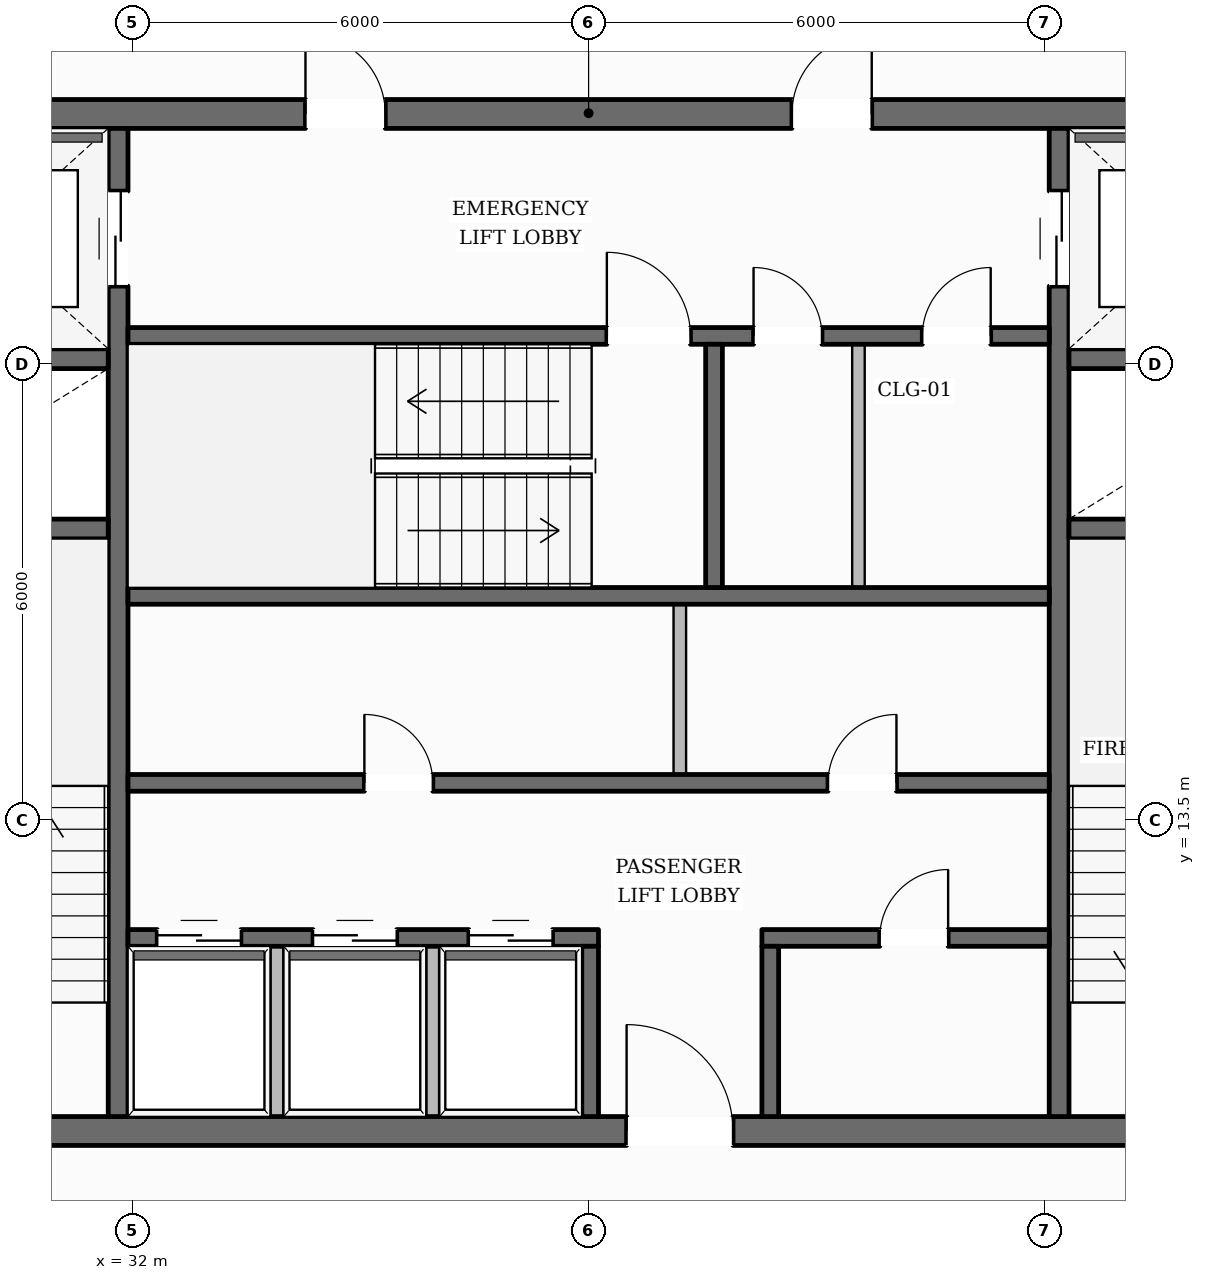
"""IFC4 building model, lengths in metres.
Left out: names, types, materials, properties, quantities, classifications, styles, units other than length and angle.
Written with IfcOpenShell. Run it as: python <this file> out.ifc"""

import sys

from ifc_helpers import new_model, si_unit, direction, frame, frame_2d, origin, place, context, subcontext, project, spatial, rectangle, extrude, element, fill, save


model = new_model("IFC4")
c1 = context("Model", 3, precision=1e-05, world=origin(), true_north=direction((0.0, 1.0)))
c2 = subcontext(c1, "Body", "Model", "MODEL_VIEW")
j1 = project(units=[si_unit("LENGTHUNIT", "METRE"), si_unit("PLANEANGLEUNIT", "RADIAN")], contexts=[c1])
p1 = place(None, origin())
s1 = spatial("IfcSite", under=j1, at=p1, CompositionType="ELEMENT")
p2 = place(p1, origin())
s2 = spatial("IfcBuilding", under=s1, at=p2, CompositionType="ELEMENT")
p3 = place(p2, frame((0.0, 0.0, 247.2)))
s3 = spatial("IfcBuildingStorey", under=s2, at=p3, CompositionType="ELEMENT", Elevation=247.2)
p4 = place(p3, frame((28.1, 9.41, 0.0), z_axis=(0.0, 0.0, 1.0), x_axis=(1.0, 0.0, 0.0)))
e1 = element("IfcWall", 1, at=p4, inside=s3, PredefinedType="SOLIDWALL", context=c2, shape_type="SweptSolid", body=[
    extrude(rectangle(XDim=19.8, YDim=0.38, at=frame_2d((9.9, 0.0))), origin(), (0.0, 0.0, 1.0), 3.61),
])
p5 = place(p4, frame((10.4, 0.0, 0.0)))
e2 = element("IfcOpeningElement", 2, at=p5, cuts=e1, PredefinedType="OPENING", context=c2, shape_type="SweptSolid", body=[
    extrude(rectangle(XDim=1.4, YDim=2.2, at=frame_2d((0.7, 1.1))), frame((0.0, 0.2, 0.0), z_axis=(0.0, -1.0, 0.0), x_axis=(1.0, 0.0, 0.0)), (0.0, 0.0, 1.0), 0.4),
])
p6 = place(p3, frame((28.1, 22.79, 0.0), z_axis=(0.0, 0.0, 1.0), x_axis=(1.0, 0.0, 0.0)))
e3 = element("IfcWall", 3, at=p6, inside=s3, PredefinedType="SOLIDWALL", context=c2, shape_type="SweptSolid", body=[
    extrude(rectangle(XDim=19.8, YDim=0.38, at=frame_2d((9.9, 0.0))), origin(), (0.0, 0.0, 1.0), 3.61),
])
p7 = place(p6, frame((6.175, 0.0, 0.0)))
e4 = element("IfcOpeningElement", 4, at=p7, cuts=e3, PredefinedType="OPENING", context=c2, shape_type="SweptSolid", body=[
    extrude(rectangle(XDim=1.05, YDim=2.15, at=frame_2d((0.525, 1.075))), frame((0.0, 0.2, 0.0), z_axis=(0.0, -1.0, 0.0), x_axis=(1.0, 0.0, 0.0)), (0.0, 0.0, 1.0), 0.4),
])
p8 = place(p6, frame((12.575, 0.0, 0.0)))
e5 = element("IfcOpeningElement", 5, at=p8, cuts=e3, PredefinedType="OPENING", context=c2, shape_type="SweptSolid", body=[
    extrude(rectangle(XDim=1.05, YDim=2.15, at=frame_2d((0.525, 1.075))), frame((0.0, 0.2, 0.0), z_axis=(0.0, -1.0, 0.0), x_axis=(1.0, 0.0, 0.0)), (0.0, 0.0, 1.0), 0.4),
])
p9 = place(p3, frame((31.81, 9.6, 0.0), z_axis=(0.0, 0.0, 1.0), x_axis=(0.0, 1.0, 0.0)))
e6 = element("IfcWall", 6, at=p9, inside=s3, PredefinedType="SHEAR", context=c2, shape_type="SweptSolid", body=[
    extrude(rectangle(XDim=13.0, YDim=0.26, at=frame_2d((6.5, 0.0))), origin(), (0.0, 0.0, 1.0), 3.61),
])
p10 = place(p9, frame((10.925, 0.0, 0.0)))
e7 = element("IfcOpeningElement", 7, at=p10, cuts=e6, PredefinedType="OPENING", context=c2, shape_type="SweptSolid", body=[
    extrude(rectangle(XDim=1.25, YDim=2.25, at=frame_2d((0.625, 1.125))), frame((0.0, 0.14, 0.0), z_axis=(0.0, -1.0, 0.0), x_axis=(1.0, 0.0, 0.0)), (0.0, 0.0, 1.0), 0.28),
])
p11 = place(p3, frame((44.19, 9.6, 0.0), z_axis=(0.0, 0.0, 1.0), x_axis=(0.0, 1.0, 0.0)))
e8 = element("IfcWall", 8, at=p11, inside=s3, PredefinedType="SHEAR", context=c2, shape_type="SweptSolid", body=[
    extrude(rectangle(XDim=13.0, YDim=0.26, at=frame_2d((6.5, 0.0))), origin(), (0.0, 0.0, 1.0), 3.61),
])
p12 = place(p11, frame((10.925, 0.0, 0.0)))
e9 = element("IfcOpeningElement", 9, at=p12, cuts=e8, PredefinedType="OPENING", context=c2, shape_type="SweptSolid", body=[
    extrude(rectangle(XDim=1.25, YDim=2.25, at=frame_2d((0.625, 1.125))), frame((0.0, 0.14, 0.0), z_axis=(0.0, -1.0, 0.0), x_axis=(1.0, 0.0, 0.0)), (0.0, 0.0, 1.0), 0.28),
])
for number, where, z_axis, x_axis in (
    (10, (28.48, 17.33, 0.0), (0.0, 0.0, 1.0), (1.0, 0.0, 0.0)),
    (11, (28.48, 19.57, 0.0), (0.0, 0.0, 1.0), (1.0, 0.0, 0.0)),
    (12, (44.32, 17.33, 0.0), (0.0, 0.0, 1.0), (1.0, 0.0, 0.0)),
    (13, (44.32, 19.57, 0.0), (0.0, 0.0, 1.0), (1.0, 0.0, 0.0)),
):
    element("IfcWall", number, at=place(p3, frame(where, z_axis=z_axis, x_axis=x_axis)), inside=s3, PredefinedType="SHEAR", context=c2, shape_type="SweptSolid", body=[
        extrude(rectangle(XDim=3.2, YDim=0.26, at=frame_2d((1.6, 0.0))), origin(), (0.0, 0.0, 1.0), 3.61),
    ])
p13 = place(p3, frame((31.94, 19.87, 0.0), z_axis=(0.0, 0.0, 1.0), x_axis=(1.0, 0.0, 0.0)))
e14 = element("IfcWall", 14, at=p13, inside=s3, PredefinedType="SOLIDWALL", context=c2, shape_type="SweptSolid", body=[
    extrude(rectangle(XDim=12.12, YDim=0.22, at=frame_2d((6.06, 0.0))), origin(), (0.0, 0.0, 1.0), 3.61),
])
p14 = place(p13, frame((6.3, 0.0, 0.0)))
e15 = element("IfcOpeningElement", 15, at=p14, cuts=e14, PredefinedType="OPENING", context=c2, shape_type="SweptSolid", body=[
    extrude(rectangle(XDim=1.1, YDim=2.15, at=frame_2d((0.55, 1.075))), frame((0.0, 0.12, 0.0), z_axis=(0.0, -1.0, 0.0), x_axis=(1.0, 0.0, 0.0)), (0.0, 0.0, 1.0), 0.24),
])
p15 = place(p13, frame((8.23, 0.0, 0.0)))
e16 = element("IfcOpeningElement", 16, at=p15, cuts=e14, PredefinedType="OPENING", context=c2, shape_type="SweptSolid", body=[
    extrude(rectangle(XDim=0.9, YDim=2.1, at=frame_2d((0.45, 1.05))), frame((0.0, 0.12, 0.0), z_axis=(0.0, -1.0, 0.0), x_axis=(1.0, 0.0, 0.0)), (0.0, 0.0, 1.0), 0.24),
])
p16 = place(p13, frame((10.45, 0.0, 0.0)))
e17 = element("IfcOpeningElement", 17, at=p16, cuts=e14, PredefinedType="OPENING", context=c2, shape_type="SweptSolid", body=[
    extrude(rectangle(XDim=0.9, YDim=2.1, at=frame_2d((0.45, 1.05))), frame((0.0, 0.12, 0.0), z_axis=(0.0, -1.0, 0.0), x_axis=(1.0, 0.0, 0.0)), (0.0, 0.0, 1.0), 0.24),
])
p17 = place(p3, frame((31.94, 16.45, 0.0), z_axis=(0.0, 0.0, 1.0), x_axis=(1.0, 0.0, 0.0)))
e18 = element("IfcWall", 18, at=p17, inside=s3, PredefinedType="SOLIDWALL", context=c2, shape_type="SweptSolid", body=[
    extrude(rectangle(XDim=12.12, YDim=0.22, at=frame_2d((6.06, 0.0))), origin(), (0.0, 0.0, 1.0), 3.61),
])
p18 = place(p3, frame((39.65, 16.56, 0.0), z_axis=(0.0, 0.0, 1.0), x_axis=(0.0, 1.0, 0.0)))
e19 = element("IfcWall", 19, at=p18, inside=s3, PredefinedType="SOLIDWALL", context=c2, shape_type="SweptSolid", body=[
    extrude(rectangle(XDim=3.2, YDim=0.22, at=frame_2d((1.6, 0.0))), origin(), (0.0, 0.0, 1.0), 3.61),
])
p19 = place(p3, frame((31.94, 13.99, 0.0), z_axis=(0.0, 0.0, 1.0), x_axis=(1.0, 0.0, 0.0)))
e20 = element("IfcWall", 20, at=p19, inside=s3, PredefinedType="SOLIDWALL", context=c2, shape_type="SweptSolid", body=[
    extrude(rectangle(XDim=12.12, YDim=0.22, at=frame_2d((6.06, 0.0))), origin(), (0.0, 0.0, 1.0), 3.61),
])
p20 = place(p19, frame((3.11, 0.0, 0.0)))
e21 = element("IfcOpeningElement", 21, at=p20, cuts=e20, PredefinedType="OPENING", context=c2, shape_type="SweptSolid", body=[
    extrude(rectangle(XDim=0.9, YDim=2.1, at=frame_2d((0.45, 1.05))), frame((0.0, 0.12, 0.0), z_axis=(0.0, -1.0, 0.0), x_axis=(1.0, 0.0, 0.0)), (0.0, 0.0, 1.0), 0.24),
])
p21 = place(p19, frame((9.21, 0.0, 0.0)))
e22 = element("IfcOpeningElement", 22, at=p21, cuts=e20, PredefinedType="OPENING", context=c2, shape_type="SweptSolid", body=[
    extrude(rectangle(XDim=0.9, YDim=2.1, at=frame_2d((0.45, 1.05))), frame((0.0, 0.12, 0.0), z_axis=(0.0, -1.0, 0.0), x_axis=(1.0, 0.0, 0.0)), (0.0, 0.0, 1.0), 0.24),
])
p22 = place(p3, frame((31.94, 11.95, 0.0), z_axis=(0.0, 0.0, 1.0), x_axis=(1.0, 0.0, 0.0)))
e23 = element("IfcWall", 23, at=p22, inside=s3, PredefinedType="SOLIDWALL", context=c2, shape_type="SweptSolid", body=[
    extrude(rectangle(XDim=6.19, YDim=0.22, at=frame_2d((3.095, 0.0))), origin(), (0.0, 0.0, 1.0), 3.61),
])
p23 = place(p22, frame((0.385, 0.0, 0.0)))
e24 = element("IfcOpeningElement", 24, at=p23, cuts=e23, PredefinedType="OPENING", context=c2, shape_type="SweptSolid", body=[
    extrude(rectangle(XDim=1.1, YDim=2.2, at=frame_2d((0.55, 1.1))), frame((0.0, 0.12, 0.0), z_axis=(0.0, -1.0, 0.0), x_axis=(1.0, 0.0, 0.0)), (0.0, 0.0, 1.0), 0.24),
])
p24 = place(p22, frame((2.435, 0.0, 0.0)))
e25 = element("IfcOpeningElement", 25, at=p24, cuts=e23, PredefinedType="OPENING", context=c2, shape_type="SweptSolid", body=[
    extrude(rectangle(XDim=1.1, YDim=2.2, at=frame_2d((0.55, 1.1))), frame((0.0, 0.12, 0.0), z_axis=(0.0, -1.0, 0.0), x_axis=(1.0, 0.0, 0.0)), (0.0, 0.0, 1.0), 0.24),
])
p25 = place(p22, frame((4.485, 0.0, 0.0)))
e26 = element("IfcOpeningElement", 26, at=p25, cuts=e23, PredefinedType="OPENING", context=c2, shape_type="SweptSolid", body=[
    extrude(rectangle(XDim=1.1, YDim=2.2, at=frame_2d((0.55, 1.1))), frame((0.0, 0.12, 0.0), z_axis=(0.0, -1.0, 0.0), x_axis=(1.0, 0.0, 0.0)), (0.0, 0.0, 1.0), 0.24),
])
p26 = place(p3, frame((40.28, 11.95, 0.0), z_axis=(0.0, 0.0, 1.0), x_axis=(1.0, 0.0, 0.0)))
e27 = element("IfcWall", 27, at=p26, inside=s3, PredefinedType="SOLIDWALL", context=c2, shape_type="SweptSolid", body=[
    extrude(rectangle(XDim=3.78, YDim=0.22, at=frame_2d((1.89, 0.0))), origin(), (0.0, 0.0, 1.0), 3.61),
])
p27 = place(p26, frame((1.55, 0.0, 0.0)))
e28 = element("IfcOpeningElement", 28, at=p27, cuts=e27, PredefinedType="OPENING", context=c2, shape_type="SweptSolid", body=[
    extrude(rectangle(XDim=0.9, YDim=2.1, at=frame_2d((0.45, 1.05))), frame((0.0, 0.12, 0.0), z_axis=(0.0, -1.0, 0.0), x_axis=(1.0, 0.0, 0.0)), (0.0, 0.0, 1.0), 0.24),
])
for number, where, z_axis, x_axis in (
    (29, (38.02, 9.6, 0.0), (0.0, 0.0, 1.0), (0.0, 1.0, 0.0)),
    (30, (40.39, 9.6, 0.0), (0.0, 0.0, 1.0), (0.0, 1.0, 0.0)),
):
    element("IfcWall", number, at=place(p3, frame(where, z_axis=z_axis, x_axis=x_axis)), inside=s3, PredefinedType="SOLIDWALL", context=c2, shape_type="SweptSolid", body=[
        extrude(rectangle(XDim=2.24, YDim=0.22, at=frame_2d((1.12, 0.0))), origin(), (0.0, 0.0, 1.0), 3.61),
    ])
p28 = place(p3, frame((16.282, 11.281, 0.0), z_axis=(0.0, 0.0, 1.0), x_axis=(0.492304911919, 0.870422813178, 0.0)))
e31 = element("IfcWall", 31, at=p28, inside=s3, PredefinedType="STANDARD", context=c2, shape_type="SweptSolid", body=[
    extrude(rectangle(XDim=37.613, YDim=0.35, at=frame_2d((18.807, 0.0))), origin(), (0.0, 0.0, 1.0), 3.196),
])
p29 = place(p28, frame((9.003, 0.0, 0.0)))
e32 = element("IfcOpeningElement", 32, at=p29, cuts=e31, PredefinedType="OPENING", context=c2, shape_type="SweptSolid", body=[
    extrude(rectangle(XDim=1.0, YDim=2.2, at=frame_2d((0.5, 1.1))), frame((0.0, 0.185, 0.0), z_axis=(0.0, -1.0, 0.0), x_axis=(1.0, 0.0, 0.0)), (0.0, 0.0, 1.0), 0.37),
])
p30 = place(p28, frame((33.4, 0.0, 0.65)))
e33 = element("IfcOpeningElement", 33, at=p30, cuts=e31, PredefinedType="OPENING", context=c2, shape_type="SweptSolid", body=[
    extrude(rectangle(XDim=1.35, YDim=1.75, at=frame_2d((0.675, 0.875))), frame((0.0, 0.185, 0.0), z_axis=(0.0, -1.0, 0.0), x_axis=(1.0, 0.0, 0.0)), (0.0, 0.0, 1.0), 0.37),
])
p31 = place(p28, frame((27.291, 0.0, 0.65)))
e34 = element("IfcOpeningElement", 34, at=p31, cuts=e31, PredefinedType="OPENING", context=c2, shape_type="SweptSolid", body=[
    extrude(rectangle(XDim=1.35, YDim=1.75, at=frame_2d((0.675, 0.875))), frame((0.0, 0.185, 0.0), z_axis=(0.0, -1.0, 0.0), x_axis=(1.0, 0.0, 0.0)), (0.0, 0.0, 1.0), 0.37),
])
p32 = place(p28, frame((21.182, 0.0, 0.65)))
e35 = element("IfcOpeningElement", 35, at=p32, cuts=e31, PredefinedType="OPENING", context=c2, shape_type="SweptSolid", body=[
    extrude(rectangle(XDim=1.35, YDim=1.75, at=frame_2d((0.675, 0.875))), frame((0.0, 0.185, 0.0), z_axis=(0.0, -1.0, 0.0), x_axis=(1.0, 0.0, 0.0)), (0.0, 0.0, 1.0), 0.37),
])
p33 = place(p28, frame((2.854, 0.0, 0.65)))
e36 = element("IfcOpeningElement", 36, at=p33, cuts=e31, PredefinedType="OPENING", context=c2, shape_type="SweptSolid", body=[
    extrude(rectangle(XDim=1.35, YDim=1.75, at=frame_2d((0.675, 0.875))), frame((0.0, 0.185, 0.0), z_axis=(0.0, -1.0, 0.0), x_axis=(1.0, 0.0, 0.0)), (0.0, 0.0, 1.0), 0.37),
])
p34 = place(p3, frame((41.327, 43.945, 0.0), z_axis=(0.0, 0.0, 1.0), x_axis=(0.501242173683, -0.865307045691, 0.0)))
e37 = element("IfcWall", 37, at=p34, inside=s3, PredefinedType="STANDARD", context=c2, shape_type="SweptSolid", body=[
    extrude(rectangle(XDim=38.277, YDim=0.35, at=frame_2d((19.138, 0.0))), origin(), (0.0, 0.0, 1.0), 3.196),
])
p35 = place(p34, frame((9.169, 0.0, 0.0)))
e38 = element("IfcOpeningElement", 38, at=p35, cuts=e37, PredefinedType="OPENING", context=c2, shape_type="SweptSolid", body=[
    extrude(rectangle(XDim=1.0, YDim=2.2, at=frame_2d((0.5, 1.1))), frame((0.0, 0.185, 0.0), z_axis=(0.0, -1.0, 0.0), x_axis=(1.0, 0.0, 0.0)), (0.0, 0.0, 1.0), 0.37),
])
p36 = place(p34, frame((34.016, 0.0, 0.65)))
e39 = element("IfcOpeningElement", 39, at=p36, cuts=e37, PredefinedType="OPENING", context=c2, shape_type="SweptSolid", body=[
    extrude(rectangle(XDim=1.35, YDim=1.75, at=frame_2d((0.675, 0.875))), frame((0.0, 0.185, 0.0), z_axis=(0.0, -1.0, 0.0), x_axis=(1.0, 0.0, 0.0)), (0.0, 0.0, 1.0), 0.37),
])
p37 = place(p34, frame((27.795, 0.0, 0.65)))
e40 = element("IfcOpeningElement", 40, at=p37, cuts=e37, PredefinedType="OPENING", context=c2, shape_type="SweptSolid", body=[
    extrude(rectangle(XDim=1.35, YDim=1.75, at=frame_2d((0.675, 0.875))), frame((0.0, 0.185, 0.0), z_axis=(0.0, -1.0, 0.0), x_axis=(1.0, 0.0, 0.0)), (0.0, 0.0, 1.0), 0.37),
])
p38 = place(p34, frame((21.573, 0.0, 0.65)))
e41 = element("IfcOpeningElement", 41, at=p38, cuts=e37, PredefinedType="OPENING", context=c2, shape_type="SweptSolid", body=[
    extrude(rectangle(XDim=1.35, YDim=1.75, at=frame_2d((0.675, 0.875))), frame((0.0, 0.185, 0.0), z_axis=(0.0, -1.0, 0.0), x_axis=(1.0, 0.0, 0.0)), (0.0, 0.0, 1.0), 0.37),
])
p39 = place(p34, frame((2.909, 0.0, 0.65)))
e42 = element("IfcOpeningElement", 42, at=p39, cuts=e37, PredefinedType="OPENING", context=c2, shape_type="SweptSolid", body=[
    extrude(rectangle(XDim=1.35, YDim=1.75, at=frame_2d((0.675, 0.875))), frame((0.0, 0.185, 0.0), z_axis=(0.0, -1.0, 0.0), x_axis=(1.0, 0.0, 0.0)), (0.0, 0.0, 1.0), 0.37),
])
for number, where, z_axis, x_axis in (
    (43, (33.9, 9.49, 0.0), (0.0, 0.0, 1.0), (0.0, 1.0, 0.0)),
    (44, (35.95, 9.49, 0.0), (0.0, 0.0, 1.0), (0.0, 1.0, 0.0)),
):
    element("IfcWall", number, at=place(p3, frame(where, z_axis=z_axis, x_axis=x_axis)), inside=s3, PredefinedType="PARTITIONING", context=c2, shape_type="SweptSolid", body=[
        extrude(rectangle(XDim=2.35, YDim=0.165, at=frame_2d((1.175, 0.0))), origin(), (0.0, 0.0, 1.0), 3.61),
    ])
p40 = place(p3, frame((39.2, 14.1, 0.0), z_axis=(0.0, 0.0, 1.0), x_axis=(0.0, 1.0, 0.0)))
e45 = element("IfcWall", 45, at=p40, inside=s3, PredefinedType="PARTITIONING", context=c2, shape_type="SweptSolid", body=[
    extrude(rectangle(XDim=2.24, YDim=0.165, at=frame_2d((1.12, 0.0))), origin(), (0.0, 0.0, 1.0), 3.61),
])
p41 = place(p3, frame((41.55, 16.56, 0.0), z_axis=(0.0, 0.0, 1.0), x_axis=(0.0, 1.0, 0.0)))
e46 = element("IfcWall", 46, at=p41, inside=s3, PredefinedType="PARTITIONING", context=c2, shape_type="SweptSolid", body=[
    extrude(rectangle(XDim=3.2, YDim=0.165, at=frame_2d((1.6, 0.0))), origin(), (0.0, 0.0, 1.0), 3.61),
])
p42 = place(p14, origin())
e47 = element("IfcDoor", 47, at=p42, inside=s3, OperationType="SINGLE_SWING_LEFT", PredefinedType="DOOR", context=c2, shape_type="SweptSolid", body=[
    extrude(rectangle(XDim=1.1, YDim=2.15, at=frame_2d((0.55, 1.075))), frame((0.0, 0.025, 0.0), z_axis=(0.0, -1.0, 0.0), x_axis=(1.0, 0.0, 0.0)), (0.0, 0.0, 1.0), 0.05),
])
fill(e15, e47)
p43 = place(p7, origin())
e48 = element("IfcDoor", 48, at=p43, inside=s3, OperationType="SINGLE_SWING_LEFT", PredefinedType="DOOR", context=c2, shape_type="SweptSolid", body=[
    extrude(rectangle(XDim=1.05, YDim=2.15, at=frame_2d((0.525, 1.075))), frame((0.0, 0.025, 0.0), z_axis=(0.0, -1.0, 0.0), x_axis=(1.0, 0.0, 0.0)), (0.0, 0.0, 1.0), 0.05),
])
fill(e4, e48)
p44 = place(p8, origin())
e49 = element("IfcDoor", 49, at=p44, inside=s3, OperationType="SINGLE_SWING_RIGHT", PredefinedType="DOOR", context=c2, shape_type="SweptSolid", body=[
    extrude(rectangle(XDim=1.05, YDim=2.15, at=frame_2d((0.525, 1.075))), frame((0.0, 0.025, 0.0), z_axis=(0.0, -1.0, 0.0), x_axis=(1.0, 0.0, 0.0)), (0.0, 0.0, 1.0), 0.05),
])
fill(e5, e49)
p45 = place(p10, origin())
e50 = element("IfcDoor", 50, at=p45, inside=s3, OperationType="DOUBLE_DOOR_SLIDING", PredefinedType="DOOR", context=c2, shape_type="SweptSolid", body=[
    extrude(rectangle(XDim=1.25, YDim=2.25, at=frame_2d((0.625, 1.125))), frame((0.0, 0.025, 0.0), z_axis=(0.0, -1.0, 0.0), x_axis=(1.0, 0.0, 0.0)), (0.0, 0.0, 1.0), 0.05),
])
fill(e7, e50)
p46 = place(p12, origin())
e51 = element("IfcDoor", 51, at=p46, inside=s3, OperationType="DOUBLE_DOOR_SLIDING", PredefinedType="DOOR", context=c2, shape_type="SweptSolid", body=[
    extrude(rectangle(XDim=1.25, YDim=2.25, at=frame_2d((0.625, 1.125))), frame((0.0, 0.025, 0.0), z_axis=(0.0, -1.0, 0.0), x_axis=(1.0, 0.0, 0.0)), (0.0, 0.0, 1.0), 0.05),
])
fill(e9, e51)
p47 = place(p5, origin())
e52 = element("IfcDoor", 52, at=p47, inside=s3, OperationType="SINGLE_SWING_LEFT", PredefinedType="DOOR", context=c2, shape_type="SweptSolid", body=[
    extrude(rectangle(XDim=1.4, YDim=2.2, at=frame_2d((0.7, 1.1))), frame((0.0, 0.025, 0.0), z_axis=(0.0, -1.0, 0.0), x_axis=(1.0, 0.0, 0.0)), (0.0, 0.0, 1.0), 0.05),
])
fill(e2, e52)
p48 = place(p23, origin())
e53 = element("IfcDoor", 53, at=p48, inside=s3, OperationType="DOUBLE_DOOR_SLIDING", PredefinedType="DOOR", context=c2, shape_type="SweptSolid", body=[
    extrude(rectangle(XDim=1.1, YDim=2.2, at=frame_2d((0.55, 1.1))), frame((0.0, 0.025, 0.0), z_axis=(0.0, -1.0, 0.0), x_axis=(1.0, 0.0, 0.0)), (0.0, 0.0, 1.0), 0.05),
])
fill(e24, e53)
p49 = place(p24, origin())
e54 = element("IfcDoor", 54, at=p49, inside=s3, OperationType="DOUBLE_DOOR_SLIDING", PredefinedType="DOOR", context=c2, shape_type="SweptSolid", body=[
    extrude(rectangle(XDim=1.1, YDim=2.2, at=frame_2d((0.55, 1.1))), frame((0.0, 0.025, 0.0), z_axis=(0.0, -1.0, 0.0), x_axis=(1.0, 0.0, 0.0)), (0.0, 0.0, 1.0), 0.05),
])
fill(e25, e54)
p50 = place(p25, origin())
e55 = element("IfcDoor", 55, at=p50, inside=s3, OperationType="DOUBLE_DOOR_SLIDING", PredefinedType="DOOR", context=c2, shape_type="SweptSolid", body=[
    extrude(rectangle(XDim=1.1, YDim=2.2, at=frame_2d((0.55, 1.1))), frame((0.0, 0.025, 0.0), z_axis=(0.0, -1.0, 0.0), x_axis=(1.0, 0.0, 0.0)), (0.0, 0.0, 1.0), 0.05),
])
fill(e26, e55)
p51 = place(p20, origin())
e56 = element("IfcDoor", 56, at=p51, inside=s3, OperationType="SINGLE_SWING_LEFT", PredefinedType="DOOR", context=c2, shape_type="SweptSolid", body=[
    extrude(rectangle(XDim=0.9, YDim=2.1, at=frame_2d((0.45, 1.05))), frame((0.0, 0.025, 0.0), z_axis=(0.0, -1.0, 0.0), x_axis=(1.0, 0.0, 0.0)), (0.0, 0.0, 1.0), 0.05),
])
fill(e21, e56)
p52 = place(p21, origin())
e57 = element("IfcDoor", 57, at=p52, inside=s3, OperationType="SINGLE_SWING_RIGHT", PredefinedType="DOOR", context=c2, shape_type="SweptSolid", body=[
    extrude(rectangle(XDim=0.9, YDim=2.1, at=frame_2d((0.45, 1.05))), frame((0.0, 0.025, 0.0), z_axis=(0.0, -1.0, 0.0), x_axis=(1.0, 0.0, 0.0)), (0.0, 0.0, 1.0), 0.05),
])
fill(e22, e57)
p53 = place(p15, origin())
e58 = element("IfcDoor", 58, at=p53, inside=s3, OperationType="SINGLE_SWING_LEFT", PredefinedType="DOOR", context=c2, shape_type="SweptSolid", body=[
    extrude(rectangle(XDim=0.9, YDim=2.1, at=frame_2d((0.45, 1.05))), frame((0.0, 0.025, 0.0), z_axis=(0.0, -1.0, 0.0), x_axis=(1.0, 0.0, 0.0)), (0.0, 0.0, 1.0), 0.05),
])
fill(e16, e58)
p54 = place(p16, origin())
e59 = element("IfcDoor", 59, at=p54, inside=s3, OperationType="SINGLE_SWING_RIGHT", PredefinedType="DOOR", context=c2, shape_type="SweptSolid", body=[
    extrude(rectangle(XDim=0.9, YDim=2.1, at=frame_2d((0.45, 1.05))), frame((0.0, 0.025, 0.0), z_axis=(0.0, -1.0, 0.0), x_axis=(1.0, 0.0, 0.0)), (0.0, 0.0, 1.0), 0.05),
])
fill(e17, e59)
p55 = place(p27, origin())
e60 = element("IfcDoor", 60, at=p55, inside=s3, OperationType="SINGLE_SWING_RIGHT", PredefinedType="DOOR", context=c2, shape_type="SweptSolid", body=[
    extrude(rectangle(XDim=0.9, YDim=2.1, at=frame_2d((0.45, 1.05))), frame((0.0, 0.025, 0.0), z_axis=(0.0, -1.0, 0.0), x_axis=(1.0, 0.0, 0.0)), (0.0, 0.0, 1.0), 0.05),
])
fill(e28, e60)
save(model, sys.argv[1])
